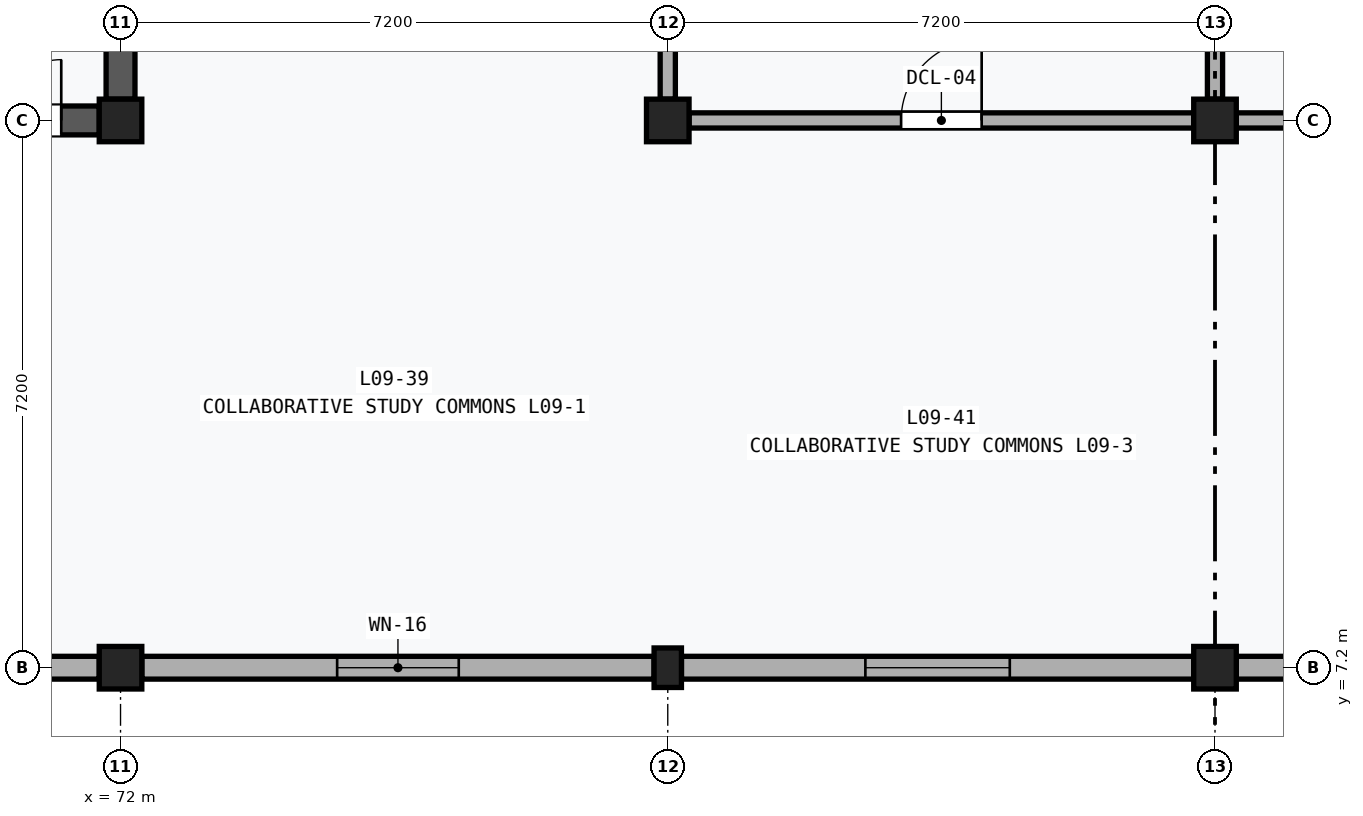
"""IFC4 building model, lengths in metres.
Left out: names, types, materials, properties, quantities, classifications, styles, units other than length and angle.
Written with IfcOpenShell. Run it as: python <this file> out.ifc"""

import sys

from ifc_helpers import new_model, si_unit, direction, frame, frame_2d, origin, origin_2d, place, context, subcontext, project, spatial, rectangle, extrude, element, fill, save


model = new_model("IFC4")
c1 = context("Model", 3, precision=1e-05, world=origin(), true_north=direction((0.0, 1.0)))
c2 = subcontext(c1, "Body", "Model", "MODEL_VIEW")
j1 = project(units=[si_unit("LENGTHUNIT", "METRE"), si_unit("PLANEANGLEUNIT", "RADIAN")], contexts=[c1])
p1 = place(None, origin())
s1 = spatial("IfcSite", under=j1, at=p1, CompositionType="ELEMENT")
p2 = place(p1, origin())
s2 = spatial("IfcBuilding", under=s1, at=p2, CompositionType="ELEMENT")
p3 = place(p2, frame((0.0, 0.0, 38.8)))
s3 = spatial("IfcBuildingStorey", under=s2, at=p3, CompositionType="ELEMENT", Elevation=38.8)
for number, where, z_axis, x_axis in (
    (1, (72.0, 7.2, 0.0), (0.0, 0.0, 1.0), (1.0, 0.0, 0.0)),
    (2, (72.0, 14.4, 0.0), (0.0, 0.0, 1.0), (1.0, 0.0, 0.0)),
):
    element("IfcColumn", number, at=place(p3, frame(where, z_axis=z_axis, x_axis=x_axis)), inside=s3, PredefinedType="COLUMN", context=c2, shape_type="SweptSolid", body=[
        extrude(rectangle(XDim=0.56, YDim=0.56, at=origin_2d()), origin(), (0.0, 0.0, 1.0), 4.0),
    ])
p4 = place(p3, frame((79.2, 7.2, 0.0), z_axis=(0.0, 0.0, 1.0), x_axis=(1.0, 0.0, 0.0)))
e3 = element("IfcColumn", 3, at=p4, inside=s3, PredefinedType="PILASTER", context=c2, shape_type="SweptSolid", body=[
    extrude(rectangle(XDim=0.36, YDim=0.52, at=origin_2d()), origin(), (0.0, 0.0, 1.0), 4.0),
])
for number, where, z_axis, x_axis in (
    (4, (79.2, 14.4, 0.0), (0.0, 0.0, 1.0), (1.0, 0.0, 0.0)),
    (5, (86.4, 7.2, 0.0), (0.0, 0.0, 1.0), (1.0, 0.0, 0.0)),
    (6, (86.4, 14.4, 0.0), (0.0, 0.0, 1.0), (1.0, 0.0, 0.0)),
):
    element("IfcColumn", number, at=place(p3, frame(where, z_axis=z_axis, x_axis=x_axis)), inside=s3, PredefinedType="COLUMN", context=c2, shape_type="SweptSolid", body=[
        extrude(rectangle(XDim=0.56, YDim=0.56, at=origin_2d()), origin(), (0.0, 0.0, 1.0), 4.0),
    ])
p5 = place(p3, frame((65.08, 7.2, 0.0), z_axis=(0.0, 0.0, 1.0), x_axis=(1.0, 0.0, 0.0)))
e7 = element("IfcWall", 7, at=p5, inside=s3, PredefinedType="SOLIDWALL", context=c2, shape_type="SweptSolid", body=[
    extrude(rectangle(XDim=6.64, YDim=0.3, at=frame_2d((3.32, 0.0))), origin(), (0.0, 0.0, 1.0), 3.17),
])
p6 = place(p5, frame((1.67, 0.0, 0.85)))
e8 = element("IfcOpeningElement", 8, at=p6, cuts=e7, PredefinedType="OPENING", context=c2, shape_type="SweptSolid", body=[
    extrude(rectangle(XDim=3.3, YDim=2.0, at=frame_2d((1.65, 1.0))), frame((0.0, 0.162, 0.0), z_axis=(0.0, -1.0, 0.0), x_axis=(1.0, 0.0, 0.0)), (0.0, 0.0, 1.0), 0.324),
])
p7 = place(p3, frame((72.28, 7.2, 0.0), z_axis=(0.0, 0.0, 1.0), x_axis=(1.0, 0.0, 0.0)))
e9 = element("IfcWall", 9, at=p7, inside=s3, PredefinedType="SOLIDWALL", context=c2, shape_type="SweptSolid", body=[
    extrude(rectangle(XDim=6.74, YDim=0.3, at=frame_2d((3.37, 0.0))), origin(), (0.0, 0.0, 1.0), 3.17),
])
p8 = place(p7, frame((2.57, 0.0, 1.1)))
e10 = element("IfcOpeningElement", 10, at=p8, cuts=e9, PredefinedType="OPENING", context=c2, shape_type="SweptSolid", body=[
    extrude(rectangle(XDim=1.6, YDim=1.5, at=frame_2d((0.8, 0.75))), frame((0.0, 0.162, 0.0), z_axis=(0.0, -1.0, 0.0), x_axis=(1.0, 0.0, 0.0)), (0.0, 0.0, 1.0), 0.324),
])
p9 = place(p3, frame((79.38, 7.2, 0.0), z_axis=(0.0, 0.0, 1.0), x_axis=(1.0, 0.0, 0.0)))
e11 = element("IfcWall", 11, at=p9, inside=s3, PredefinedType="SOLIDWALL", context=c2, shape_type="SweptSolid", body=[
    extrude(rectangle(XDim=6.74, YDim=0.3, at=frame_2d((3.37, 0.0))), origin(), (0.0, 0.0, 1.0), 3.17),
])
p10 = place(p9, frame((2.42, 0.0, 1.1)))
e12 = element("IfcOpeningElement", 12, at=p10, cuts=e11, PredefinedType="OPENING", context=c2, shape_type="SweptSolid", body=[
    extrude(rectangle(XDim=1.9, YDim=1.5, at=frame_2d((0.95, 0.75))), frame((0.0, 0.162, 0.0), z_axis=(0.0, -1.0, 0.0), x_axis=(1.0, 0.0, 0.0)), (0.0, 0.0, 1.0), 0.324),
])
p11 = place(p3, frame((86.68, 7.2, 0.0), z_axis=(0.0, 0.0, 1.0), x_axis=(1.0, 0.0, 0.0)))
e13 = element("IfcWall", 13, at=p11, inside=s3, PredefinedType="SOLIDWALL", context=c2, shape_type="SweptSolid", body=[
    extrude(rectangle(XDim=6.64, YDim=0.3, at=frame_2d((3.32, 0.0))), origin(), (0.0, 0.0, 1.0), 3.17),
])
p12 = place(p11, frame((2.22, 0.0, 1.1)))
e14 = element("IfcOpeningElement", 14, at=p12, cuts=e13, PredefinedType="OPENING", context=c2, shape_type="SweptSolid", body=[
    extrude(rectangle(XDim=2.2, YDim=1.5, at=frame_2d((1.1, 0.75))), frame((0.0, 0.162, 0.0), z_axis=(0.0, -1.0, 0.0), x_axis=(1.0, 0.0, 0.0)), (0.0, 0.0, 1.0), 0.324),
])
p13 = place(p3, frame((72.0, 14.68, 0.0), z_axis=(0.0, 0.0, 1.0), x_axis=(0.0, 1.0, 0.0)))
e15 = element("IfcWall", 15, at=p13, inside=s3, PredefinedType="SHEAR", context=c2, shape_type="SweptSolid", body=[
    extrude(rectangle(XDim=6.64, YDim=0.38, at=frame_2d((3.32, 0.0))), origin(), (0.0, 0.0, 1.0), 3.01),
])
p14 = place(p13, frame((2.2, 0.0, 0.0)))
e16 = element("IfcOpeningElement", 16, at=p14, cuts=e15, PredefinedType="OPENING", context=c2, shape_type="SweptSolid", body=[
    extrude(rectangle(XDim=1.6, YDim=2.2, at=frame_2d((0.8, 1.1))), frame((0.0, 0.202, 0.0), z_axis=(0.0, -1.0, 0.0), x_axis=(1.0, 0.0, 0.0)), (0.0, 0.0, 1.0), 0.404),
])
p15 = place(p3, frame((65.08, 14.4, 0.0), z_axis=(0.0, 0.0, 1.0), x_axis=(1.0, 0.0, 0.0)))
e17 = element("IfcWall", 17, at=p15, inside=s3, PredefinedType="SHEAR", context=c2, shape_type="SweptSolid", body=[
    extrude(rectangle(XDim=6.64, YDim=0.38, at=frame_2d((3.32, 0.0))), origin(), (0.0, 0.0, 1.0), 3.01),
])
p16 = place(p15, frame((4.54, 0.0, 0.0)))
e18 = element("IfcOpeningElement", 18, at=p16, cuts=e17, PredefinedType="OPENING", context=c2, shape_type="SweptSolid", body=[
    extrude(rectangle(XDim=1.6, YDim=2.2, at=frame_2d((0.8, 1.1))), frame((0.0, 0.202, 0.0), z_axis=(0.0, -1.0, 0.0), x_axis=(1.0, 0.0, 0.0)), (0.0, 0.0, 1.0), 0.404),
])
p17 = place(p3, frame((79.48, 14.4, 0.0), z_axis=(0.0, 0.0, 1.0), x_axis=(1.0, 0.0, 0.0)))
e19 = element("IfcWall", 19, at=p17, inside=s3, PredefinedType="PARTITIONING", context=c2, shape_type="SweptSolid", body=[
    extrude(rectangle(XDim=6.64, YDim=0.2, at=frame_2d((3.32, 0.0))), origin(), (0.0, 0.0, 1.0), 3.01),
])
p18 = place(p17, frame((2.79, 0.0, 0.0)))
e20 = element("IfcOpeningElement", 20, at=p18, cuts=e19, PredefinedType="OPENING", context=c2, shape_type="SweptSolid", body=[
    extrude(rectangle(XDim=1.06, YDim=2.16, at=frame_2d((0.53, 1.08))), frame((0.0, 0.112, 0.0), z_axis=(0.0, -1.0, 0.0), x_axis=(1.0, 0.0, 0.0)), (0.0, 0.0, 1.0), 0.224),
])
for number, where, z_axis, x_axis in (
    (21, (79.2, 14.68, 0.0), (0.0, 0.0, 1.0), (0.0, 1.0, 0.0)),
    (22, (86.4, 14.68, 0.0), (0.0, 0.0, 1.0), (0.0, 1.0, 0.0)),
):
    element("IfcWall", number, at=place(p3, frame(where, z_axis=z_axis, x_axis=x_axis)), inside=s3, PredefinedType="PARTITIONING", context=c2, shape_type="SweptSolid", body=[
        extrude(rectangle(XDim=6.64, YDim=0.2, at=frame_2d((3.32, 0.0))), origin(), (0.0, 0.0, 1.0), 3.01),
    ])
p19 = place(p3, frame((86.68, 14.4, 0.0), z_axis=(0.0, 0.0, 1.0), x_axis=(1.0, 0.0, 0.0)))
e23 = element("IfcWall", 23, at=p19, inside=s3, PredefinedType="PARTITIONING", context=c2, shape_type="SweptSolid", body=[
    extrude(rectangle(XDim=6.64, YDim=0.2, at=frame_2d((3.32, 0.0))), origin(), (0.0, 0.0, 1.0), 3.01),
])
p20 = place(p19, frame((2.74, 0.0, 0.0)))
e24 = element("IfcOpeningElement", 24, at=p20, cuts=e23, PredefinedType="OPENING", context=c2, shape_type="SweptSolid", body=[
    extrude(rectangle(XDim=1.16, YDim=2.22, at=frame_2d((0.58, 1.11))), frame((0.0, 0.112, 0.0), z_axis=(0.0, -1.0, 0.0), x_axis=(1.0, 0.0, 0.0)), (0.0, 0.0, 1.0), 0.224),
])
p21 = place(p8, origin())
e25 = element("IfcWindow", 25, at=p21, inside=s3, PartitioningType="SINGLE_PANEL", PredefinedType="WINDOW", context=c2, shape_type="SweptSolid", body=[
    extrude(rectangle(XDim=1.6, YDim=1.5, at=frame_2d((0.8, 0.75))), frame((0.0, 0.03, 0.0), z_axis=(0.0, -1.0, 0.0), x_axis=(1.0, 0.0, 0.0)), (0.0, 0.0, 1.0), 0.06),
])
fill(e10, e25)
p22 = place(p10, origin())
e26 = element("IfcWindow", 26, at=p22, inside=s3, PartitioningType="SINGLE_PANEL", PredefinedType="WINDOW", context=c2, shape_type="SweptSolid", body=[
    extrude(rectangle(XDim=1.9, YDim=1.5, at=frame_2d((0.95, 0.75))), frame((0.0, 0.03, 0.0), z_axis=(0.0, -1.0, 0.0), x_axis=(1.0, 0.0, 0.0)), (0.0, 0.0, 1.0), 0.06),
])
fill(e12, e26)
p23 = place(p16, origin())
e27 = element("IfcDoor", 27, at=p23, inside=s3, OperationType="DOUBLE_DOOR_SINGLE_SWING", PredefinedType="DOOR", context=c2, shape_type="SweptSolid", body=[
    extrude(rectangle(XDim=1.6, YDim=2.2, at=frame_2d((0.8, 1.1))), frame((0.0, 0.025, 0.0), z_axis=(0.0, -1.0, 0.0), x_axis=(1.0, 0.0, 0.0)), (0.0, 0.0, 1.0), 0.05),
])
fill(e18, e27)
p24 = place(p18, origin())
e28 = element("IfcDoor", 28, at=p24, inside=s3, OperationType="SINGLE_SWING_RIGHT", PredefinedType="DOOR", context=c2, shape_type="SweptSolid", body=[
    extrude(rectangle(XDim=1.06, YDim=2.16, at=frame_2d((0.53, 1.08))), frame((0.0, 0.025, 0.0), z_axis=(0.0, -1.0, 0.0), x_axis=(1.0, 0.0, 0.0)), (0.0, 0.0, 1.0), 0.05),
])
fill(e20, e28)
save(model, sys.argv[1])
